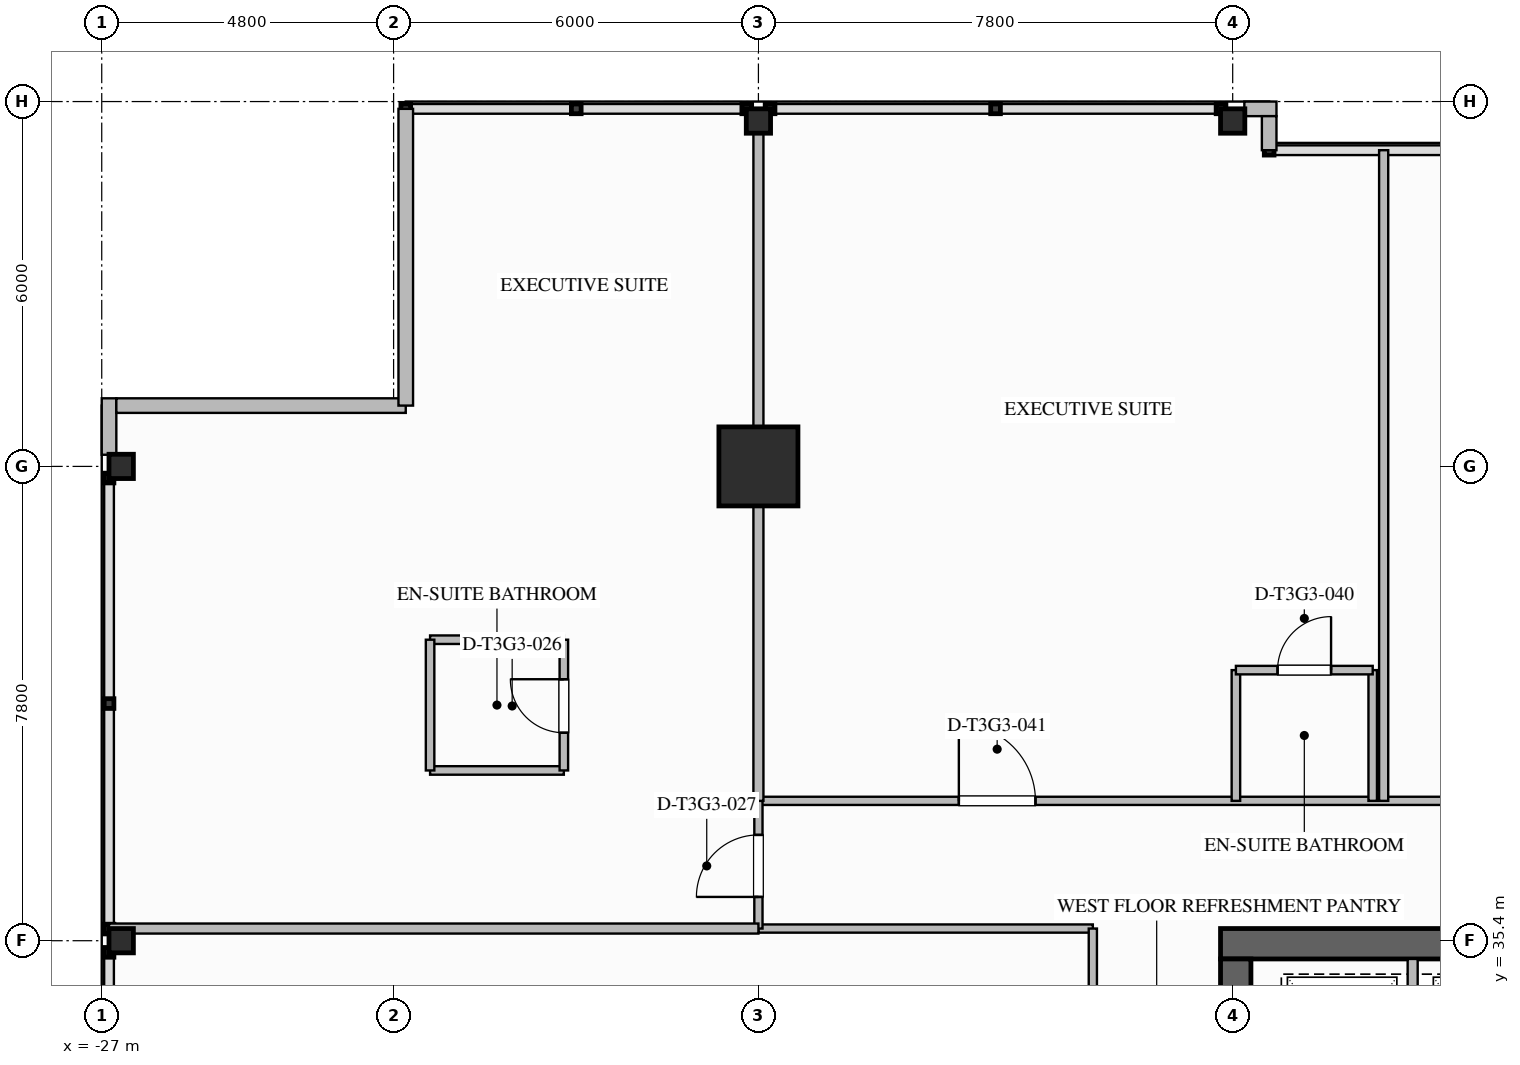
"""IFC4 building model, lengths in metres.
Left out: names, types, materials, properties, quantities, classifications, styles, units other than length and angle.
Written with IfcOpenShell. Run it as: python <this file> out.ifc"""

import sys

from ifc_helpers import new_model, si_unit, direction, frame, frame_2d, origin, origin_2d, place, context, subcontext, project, spatial, rectangle, i_section, extrude, element, fill, save


model = new_model("IFC4")
c1 = context("Model", 3, precision=1e-05, world=origin(), true_north=direction((0.0, 1.0)))
c2 = subcontext(c1, "Body", "Model", "MODEL_VIEW")
j1 = project(units=[si_unit("LENGTHUNIT", "METRE"), si_unit("PLANEANGLEUNIT", "RADIAN")], contexts=[c1])
p1 = place(None, origin())
s1 = spatial("IfcSite", under=j1, at=p1, CompositionType="ELEMENT")
p2 = place(p1, origin())
s2 = spatial("IfcBuilding", under=s1, at=p2, CompositionType="ELEMENT")
p3 = place(p2, frame((0.0, 0.0, 178.8)))
s3 = spatial("IfcBuildingStorey", under=s2, at=p3, CompositionType="ELEMENT", Elevation=178.8)
p4 = place(p3, frame((-8.6, 35.35, 0.0), z_axis=(0.0, 0.0, 1.0), x_axis=(1.0, 0.0, 0.0)))
e1 = element("IfcWall", 1, at=p4, inside=s3, PredefinedType="SHEAR", context=c2, shape_type="SweptSolid", body=[
    extrude(rectangle(XDim=17.2, YDim=0.5, at=frame_2d((8.6, 0.0))), origin(), (0.0, 0.0, 1.0), 3.55),
])
p5 = place(p3, frame((-8.35, 18.9, 0.0), z_axis=(0.0, 0.0, 1.0), x_axis=(0.0, 1.0, 0.0)))
e2 = element("IfcWall", 2, at=p5, inside=s3, PredefinedType="SHEAR", context=c2, shape_type="SweptSolid", body=[
    extrude(rectangle(XDim=16.2, YDim=0.5, at=frame_2d((8.1, 0.0))), origin(), (0.0, 0.0, 1.0), 3.55),
])
p6 = place(p5, frame((12.02, 0.0, 0.0)))
e3 = element("IfcOpeningElement", 3, at=p6, cuts=e2, PredefinedType="OPENING", context=c2, shape_type="SweptSolid", body=[
    extrude(rectangle(XDim=1.08, YDim=2.04, at=frame_2d((0.54, 1.02))), frame((0.0, 0.26, 0.0), z_axis=(0.0, -1.0, 0.0), x_axis=(1.0, 0.0, 0.0)), (0.0, 0.0, 1.0), 0.52),
])
p7 = place(p5, frame((4.5, 0.0, 0.0)))
e4 = element("IfcOpeningElement", 4, at=p7, cuts=e2, PredefinedType="OPENING", context=c2, shape_type="SweptSolid", body=[
    extrude(rectangle(XDim=1.08, YDim=2.04, at=frame_2d((0.54, 1.02))), frame((0.0, 0.26, 0.0), z_axis=(0.0, -1.0, 0.0), x_axis=(1.0, 0.0, 0.0)), (0.0, 0.0, 1.0), 0.52),
])
p8 = place(p3, frame((-16.2, 43.2, 0.0), z_axis=(0.0, 0.0, 1.0), x_axis=(1.0, 0.0, 0.0)))
e5 = element("IfcColumn", 5, at=p8, inside=s3, PredefinedType="COLUMN", context=c2, shape_type="SweptSolid", body=[
    extrude(rectangle(XDim=1.3, YDim=1.3, at=origin_2d()), origin(), (0.0, 0.0, 1.0), 3.55),
])
for number, where, z_axis, x_axis in (
    (6, (-26.68, 35.4, 0.0), (0.0, 0.0, 1.0), (1.0, 0.0, 0.0)),
    (7, (-26.68, 43.2, 0.0), (0.0, 0.0, 1.0), (1.0, 0.0, 0.0)),
    (8, (-16.2, 48.88, 0.0), (0.0, 0.0, 1.0), (0.0, 1.0, 0.0)),
    (9, (-8.4, 48.88, 0.0), (0.0, 0.0, 1.0), (0.0, 1.0, 0.0)),
):
    element("IfcColumn", number, at=place(p3, frame(where, z_axis=z_axis, x_axis=x_axis)), inside=s3, PredefinedType="COLUMN", context=c2, shape_type="SweptSolid", body=[
        extrude(i_section(OverallWidth=0.401, OverallDepth=0.399, WebThickness=0.025, FlangeThickness=0.04, FilletRadius=0.025, at=origin_2d()), origin(), (0.0, 0.0, 1.0), 3.547),
    ])
p9 = place(p3, frame((-26.88, 43.392, 0.0), z_axis=(0.0, 0.0, 1.0), x_axis=(0.0, 1.0, 0.0)))
e10 = element("IfcWall", 10, at=p9, inside=s3, PredefinedType="STANDARD", context=c2, shape_type="SweptSolid", body=[
    extrude(rectangle(XDim=0.928, YDim=0.24, at=frame_2d((0.464, 0.0))), origin(), (0.0, 0.0, 1.0), 3.29),
])
p10 = place(p3, frame((-8.208, 49.08, 0.0), z_axis=(0.0, 0.0, 1.0), x_axis=(1.0, 0.0, 0.0)))
e11 = element("IfcWall", 11, at=p10, inside=s3, PredefinedType="STANDARD", context=c2, shape_type="SweptSolid", body=[
    extrude(rectangle(XDim=0.528, YDim=0.24, at=frame_2d((0.264, 0.0))), origin(), (0.0, 0.0, 1.0), 3.29),
])
p11 = place(p3, frame((-26.76, 44.2, 0.0), z_axis=(0.0, 0.0, 1.0), x_axis=(1.0, 0.0, 0.0)))
e12 = element("IfcWall", 12, at=p11, inside=s3, PredefinedType="STANDARD", context=c2, shape_type="SweptSolid", body=[
    extrude(rectangle(XDim=4.76, YDim=0.24, at=frame_2d((2.38, 0.0))), origin(), (0.0, 0.0, 1.0), 3.29),
])
p12 = place(p3, frame((-22.0, 44.2, 0.0), z_axis=(0.0, 0.0, 1.0), x_axis=(0.0, 1.0, 0.0)))
e13 = element("IfcWall", 13, at=p12, inside=s3, PredefinedType="STANDARD", context=c2, shape_type="SweptSolid", body=[
    extrude(rectangle(XDim=4.88, YDim=0.24, at=frame_2d((2.44, 0.0))), origin(), (0.0, 0.0, 1.0), 3.29),
])
p13 = place(p3, frame((-7.8, 48.96, 0.0), z_axis=(0.0, 0.0, 1.0), x_axis=(0.0, -1.0, 0.0)))
e14 = element("IfcWall", 14, at=p13, inside=s3, PredefinedType="STANDARD", context=c2, shape_type="SweptSolid", body=[
    extrude(rectangle(XDim=0.56, YDim=0.24, at=frame_2d((0.28, 0.0))), origin(), (0.0, 0.0, 1.0), 3.29),
])
p14 = place(p3, frame((-5.44, 32.22, 0.0), z_axis=(0.0, 0.0, 1.0), x_axis=(0.0, 1.0, 0.0)))
e15 = element("IfcWall", 15, at=p14, inside=s3, PredefinedType="PARTITIONING", context=c2, shape_type="SweptSolid", body=[
    extrude(rectangle(XDim=2.88, YDim=0.165, at=frame_2d((1.44, 0.0))), origin(), (0.0, 0.0, 1.0), 3.29),
])
p15 = place(p3, frame((-16.2, 35.6, 0.0), z_axis=(0.0, 0.0, 1.0), x_axis=(1.0, 0.0, 0.0)))
e16 = element("IfcWall", 16, at=p15, inside=s3, PredefinedType="PARTITIONING", context=c2, shape_type="SweptSolid", body=[
    extrude(rectangle(XDim=5.5, YDim=0.135, at=frame_2d((2.75, 0.0))), origin(), (0.0, 0.0, 1.0), 2.667),
])
p16 = place(p3, frame((-16.2, 37.7, 0.0), z_axis=(0.0, 0.0, 1.0), x_axis=(1.0, 0.0, 0.0)))
e17 = element("IfcWall", 17, at=p16, inside=s3, PredefinedType="PARTITIONING", context=c2, shape_type="SweptSolid", body=[
    extrude(rectangle(XDim=24.8, YDim=0.135, at=frame_2d((12.4, 0.0))), origin(), (0.0, 0.0, 1.0), 3.29),
])
p17 = place(p16, frame((3.296, 0.0, 0.0)))
e18 = element("IfcOpeningElement", 18, at=p17, cuts=e17, PredefinedType="OPENING", context=c2, shape_type="SweptSolid", body=[
    extrude(rectangle(XDim=1.26, YDim=2.2, at=frame_2d((0.63, 1.1))), frame((0.0, 0.077, 0.0), z_axis=(0.0, -1.0, 0.0), x_axis=(1.0, 0.0, 0.0)), (0.0, 0.0, 1.0), 0.155),
])
p18 = place(p16, frame((13.1, 0.0, 0.0)))
e19 = element("IfcOpeningElement", 19, at=p18, cuts=e17, PredefinedType="OPENING", context=c2, shape_type="SweptSolid", body=[
    extrude(rectangle(XDim=1.02, YDim=2.15, at=frame_2d((0.51, 1.075))), frame((0.0, 0.077, 0.0), z_axis=(0.0, -1.0, 0.0), x_axis=(1.0, 0.0, 0.0)), (0.0, 0.0, 1.0), 0.155),
])
p19 = place(p16, frame((19.023, 0.0, 0.0)))
e20 = element("IfcOpeningElement", 20, at=p19, cuts=e17, PredefinedType="OPENING", context=c2, shape_type="SweptSolid", body=[
    extrude(rectangle(XDim=1.26, YDim=2.2, at=frame_2d((0.63, 1.1))), frame((0.0, 0.077, 0.0), z_axis=(0.0, -1.0, 0.0), x_axis=(1.0, 0.0, 0.0)), (0.0, 0.0, 1.0), 0.155),
])
p20 = place(p3, frame((-10.7, 18.4, 0.0), z_axis=(0.0, 0.0, 1.0), x_axis=(0.0, 1.0, 0.0)))
e21 = element("IfcWall", 21, at=p20, inside=s3, PredefinedType="PARTITIONING", context=c2, shape_type="SweptSolid", body=[
    extrude(rectangle(XDim=17.2, YDim=0.135, at=frame_2d((8.6, 0.0))), origin(), (0.0, 0.0, 1.0), 3.29),
])
p21 = place(p20, frame((4.255, 0.0, 0.0)))
e22 = element("IfcOpeningElement", 22, at=p21, cuts=e21, PredefinedType="OPENING", context=c2, shape_type="SweptSolid", body=[
    extrude(rectangle(XDim=1.26, YDim=2.2, at=frame_2d((0.63, 1.1))), frame((0.0, 0.077, 0.0), z_axis=(0.0, -1.0, 0.0), x_axis=(1.0, 0.0, 0.0)), (0.0, 0.0, 1.0), 0.155),
])
p22 = place(p20, frame((9.255, 0.0, 0.0)))
e23 = element("IfcOpeningElement", 23, at=p22, cuts=e21, PredefinedType="OPENING", context=c2, shape_type="SweptSolid", body=[
    extrude(rectangle(XDim=1.26, YDim=2.2, at=frame_2d((0.63, 1.1))), frame((0.0, 0.077, 0.0), z_axis=(0.0, -1.0, 0.0), x_axis=(1.0, 0.0, 0.0)), (0.0, 0.0, 1.0), 0.155),
])
p23 = place(p3, frame((-16.2, 35.6, 0.0), z_axis=(0.0, 0.0, 1.0), x_axis=(0.0, 1.0, 0.0)))
e24 = element("IfcWall", 24, at=p23, inside=s3, PredefinedType="PARTITIONING", context=c2, shape_type="SweptSolid", body=[
    extrude(rectangle(XDim=2.1, YDim=0.135, at=frame_2d((1.05, 0.0))), origin(), (0.0, 0.0, 1.0), 2.58),
])
p24 = place(p23, frame((0.52, 0.0, 0.0)))
e25 = element("IfcOpeningElement", 25, at=p24, cuts=e24, PredefinedType="OPENING", context=c2, shape_type="SweptSolid", body=[
    extrude(rectangle(XDim=1.02, YDim=2.15, at=frame_2d((0.51, 1.075))), frame((0.0, 0.077, 0.0), z_axis=(0.0, -1.0, 0.0), x_axis=(1.0, 0.0, 0.0)), (0.0, 0.0, 1.0), 0.155),
])
p25 = place(p3, frame((-16.2, 37.7, 0.0), z_axis=(0.0, 0.0, 1.0), x_axis=(0.0, 1.0, 0.0)))
e26 = element("IfcWall", 26, at=p25, inside=s3, PredefinedType="PARTITIONING", context=c2, shape_type="SweptSolid", body=[
    extrude(rectangle(XDim=11.38, YDim=0.165, at=frame_2d((5.69, 0.0))), origin(), (0.0, 0.0, 1.0), 2.58),
])
p26 = place(p3, frame((-26.88, 35.6, 0.0), z_axis=(0.0, 0.0, 1.0), x_axis=(1.0, 0.0, 0.0)))
e27 = element("IfcWall", 27, at=p26, inside=s3, PredefinedType="PARTITIONING", context=c2, shape_type="SweptSolid", body=[
    extrude(rectangle(XDim=10.68, YDim=0.165, at=frame_2d((5.34, 0.0))), origin(), (0.0, 0.0, 1.0), 2.58),
])
for number, where, z_axis, x_axis in (
    (28, (-21.6, 38.2, 0.0), (0.0, 0.0, 1.0), (1.0, 0.0, 0.0)),
    (29, (-21.6, 40.35, 0.0), (0.0, 0.0, 1.0), (1.0, 0.0, 0.0)),
):
    element("IfcWall", number, at=place(p3, frame(where, z_axis=z_axis, x_axis=x_axis)), inside=s3, PredefinedType="PLUMBINGWALL", context=c2, shape_type="SweptSolid", body=[
        extrude(rectangle(XDim=2.2, YDim=0.14, at=frame_2d((1.1, 0.0))), origin(), (0.0, 0.0, 1.0), 3.29),
    ])
p27 = place(p3, frame((-21.6, 38.2, 0.0), z_axis=(0.0, 0.0, 1.0), x_axis=(0.0, 1.0, 0.0)))
e30 = element("IfcWall", 30, at=p27, inside=s3, PredefinedType="PLUMBINGWALL", context=c2, shape_type="SweptSolid", body=[
    extrude(rectangle(XDim=2.15, YDim=0.14, at=frame_2d((1.075, 0.0))), origin(), (0.0, 0.0, 1.0), 3.29),
])
p28 = place(p3, frame((-19.4, 38.2, 0.0), z_axis=(0.0, 0.0, 1.0), x_axis=(0.0, 1.0, 0.0)))
e31 = element("IfcWall", 31, at=p28, inside=s3, PredefinedType="PLUMBINGWALL", context=c2, shape_type="SweptSolid", body=[
    extrude(rectangle(XDim=2.15, YDim=0.14, at=frame_2d((1.075, 0.0))), origin(), (0.0, 0.0, 1.0), 3.29),
])
p29 = place(p28, frame((0.62, 0.0, 0.0)))
e32 = element("IfcOpeningElement", 32, at=p29, cuts=e31, PredefinedType="OPENING", context=c2, shape_type="SweptSolid", body=[
    extrude(rectangle(XDim=0.88, YDim=2.1, at=frame_2d((0.44, 1.05))), frame((0.0, 0.08, 0.0), z_axis=(0.0, -1.0, 0.0), x_axis=(1.0, 0.0, 0.0)), (0.0, 0.0, 1.0), 0.16),
])
p30 = place(p3, frame((-8.347, 37.7, 0.0), z_axis=(0.0, 0.0, 1.0), x_axis=(0.0, 1.0, 0.0)))
e33 = element("IfcWall", 33, at=p30, inside=s3, PredefinedType="PLUMBINGWALL", context=c2, shape_type="SweptSolid", body=[
    extrude(rectangle(XDim=2.15, YDim=0.14, at=frame_2d((1.075, 0.0))), origin(), (0.0, 0.0, 1.0), 2.667),
])
p31 = place(p3, frame((-6.097, 37.7, 0.0), z_axis=(0.0, 0.0, 1.0), x_axis=(0.0, 1.0, 0.0)))
e34 = element("IfcWall", 34, at=p31, inside=s3, PredefinedType="PLUMBINGWALL", context=c2, shape_type="SweptSolid", body=[
    extrude(rectangle(XDim=2.15, YDim=0.14, at=frame_2d((1.075, 0.0))), origin(), (0.0, 0.0, 1.0), 3.29),
])
p32 = place(p3, frame((-8.347, 39.85, 0.0), z_axis=(0.0, 0.0, 1.0), x_axis=(1.0, 0.0, 0.0)))
e35 = element("IfcWall", 35, at=p32, inside=s3, PredefinedType="PLUMBINGWALL", context=c2, shape_type="SweptSolid", body=[
    extrude(rectangle(XDim=2.25, YDim=0.14, at=frame_2d((1.125, 0.0))), origin(), (0.0, 0.0, 1.0), 3.29),
])
p33 = place(p32, frame((0.685, 0.0, 0.0)))
e36 = element("IfcOpeningElement", 36, at=p33, cuts=e35, PredefinedType="OPENING", context=c2, shape_type="SweptSolid", body=[
    extrude(rectangle(XDim=0.88, YDim=2.1, at=frame_2d((0.44, 1.05))), frame((0.0, 0.08, 0.0), z_axis=(0.0, -1.0, 0.0), x_axis=(1.0, 0.0, 0.0)), (0.0, 0.0, 1.0), 0.16),
])
p34 = place(p3, frame((-5.917, 37.7, 0.0), z_axis=(0.0, 0.0, 1.0), x_axis=(0.0, 1.0, 0.0)))
e37 = element("IfcWall", 37, at=p34, inside=s3, PredefinedType="PARTITIONING", context=c2, shape_type="SweptSolid", body=[
    extrude(rectangle(XDim=10.7, YDim=0.15, at=frame_2d((5.35, 0.0))), origin(), (0.0, 0.0, 1.0), 3.29),
])
p35 = place(p29, origin())
e38 = element("IfcDoor", 38, at=p35, inside=s3, OperationType="SINGLE_SWING_RIGHT", PredefinedType="DOOR", context=c2, shape_type="SweptSolid", body=[
    extrude(rectangle(XDim=0.88, YDim=2.1, at=frame_2d((0.44, 1.05))), frame((0.0, 0.025, 0.0), z_axis=(0.0, -1.0, 0.0), x_axis=(1.0, 0.0, 0.0)), (0.0, 0.0, 1.0), 0.05),
])
fill(e32, e38)
p36 = place(p24, origin())
e39 = element("IfcDoor", 39, at=p36, inside=s3, OperationType="SINGLE_SWING_LEFT", PredefinedType="DOOR", context=c2, shape_type="SweptSolid", body=[
    extrude(rectangle(XDim=1.02, YDim=2.15, at=frame_2d((0.51, 1.075))), frame((0.0, 0.025, 0.0), z_axis=(0.0, -1.0, 0.0), x_axis=(1.0, 0.0, 0.0)), (0.0, 0.0, 1.0), 0.05),
])
fill(e25, e39)
p37 = place(p33, origin())
e40 = element("IfcDoor", 40, at=p37, inside=s3, OperationType="SINGLE_SWING_RIGHT", PredefinedType="DOOR", context=c2, shape_type="SweptSolid", body=[
    extrude(rectangle(XDim=0.88, YDim=2.1, at=frame_2d((0.44, 1.05))), frame((0.0, 0.025, 0.0), z_axis=(0.0, -1.0, 0.0), x_axis=(1.0, 0.0, 0.0)), (0.0, 0.0, 1.0), 0.05),
])
fill(e36, e40)
p38 = place(p17, origin())
e41 = element("IfcDoor", 41, at=p38, inside=s3, OperationType="SINGLE_SWING_LEFT", PredefinedType="DOOR", context=c2, shape_type="SweptSolid", body=[
    extrude(rectangle(XDim=1.26, YDim=2.2, at=frame_2d((0.63, 1.1))), frame((0.0, 0.025, 0.0), z_axis=(0.0, -1.0, 0.0), x_axis=(1.0, 0.0, 0.0)), (0.0, 0.0, 1.0), 0.05),
])
fill(e18, e41)
save(model, sys.argv[1])
